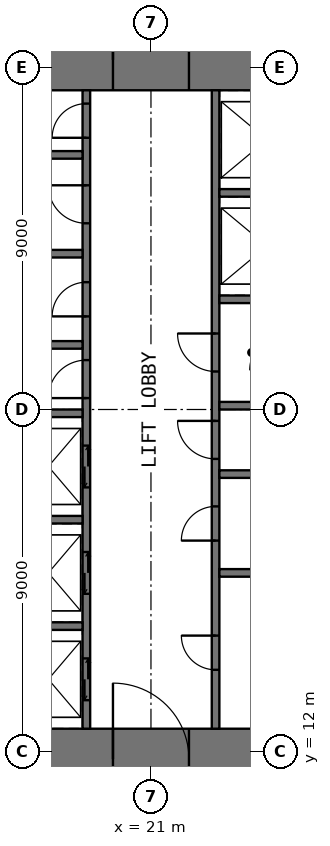
"""IFC4 building model, lengths in metres.
Left out: names, types, materials, properties, quantities, classifications, styles, units other than length and angle.
Written with IfcOpenShell. Run it as: python <this file> out.ifc"""

import sys

from ifc_helpers import new_model, si_unit, direction, frame, frame_2d, origin, place, context, subcontext, project, spatial, rectangle, extrude, element, fill, save


model = new_model("IFC4")
c1 = context("Model", 3, precision=1e-05, world=origin(), true_north=direction((0.0, 1.0)))
c2 = subcontext(c1, "Body", "Model", "MODEL_VIEW")
j1 = project(units=[si_unit("LENGTHUNIT", "METRE"), si_unit("PLANEANGLEUNIT", "RADIAN")], contexts=[c1])
p1 = place(None, origin())
s1 = spatial("IfcSite", under=j1, at=p1, CompositionType="ELEMENT")
p2 = place(p1, origin())
s2 = spatial("IfcBuilding", under=s1, at=p2, CompositionType="ELEMENT")
p3 = place(p2, frame((0.0, 0.0, 128.5)))
s3 = spatial("IfcBuildingStorey", under=s2, at=p3, CompositionType="ELEMENT", Elevation=128.5)
p4 = place(p3, frame((11.0, 11.8, -0.05), z_axis=(0.0, 0.0, 1.0), x_axis=(1.0, 0.0, 0.0)))
e1 = element("IfcWall", 1, at=p4, inside=s3, PredefinedType="SHEAR", context=c2, shape_type="SweptSolid", body=[
    extrude(rectangle(XDim=20.0, YDim=1.6, at=frame_2d((10.0, 0.0))), origin(), (0.0, 0.0, 1.0), 4.0),
])
p5 = place(p4, frame((9.0, 0.0, 0.05)))
e2 = element("IfcOpeningElement", 2, at=p5, cuts=e1, PredefinedType="OPENING", context=c2, shape_type="SweptSolid", body=[
    extrude(rectangle(XDim=2.0, YDim=2.2, at=frame_2d((1.0, 1.1))), frame((0.0, 0.81, 0.0), z_axis=(0.0, -1.0, 0.0), x_axis=(1.0, 0.0, 0.0)), (0.0, 0.0, 1.0), 1.62),
])
p6 = place(p3, frame((11.0, 30.2, -0.05), z_axis=(0.0, 0.0, 1.0), x_axis=(1.0, 0.0, 0.0)))
e3 = element("IfcWall", 3, at=p6, inside=s3, PredefinedType="SHEAR", context=c2, shape_type="SweptSolid", body=[
    extrude(rectangle(XDim=20.0, YDim=1.6, at=frame_2d((10.0, 0.0))), origin(), (0.0, 0.0, 1.0), 4.0),
])
p7 = place(p6, frame((9.0, 0.0, 0.05)))
e4 = element("IfcOpeningElement", 4, at=p7, cuts=e3, PredefinedType="OPENING", context=c2, shape_type="SweptSolid", body=[
    extrude(rectangle(XDim=2.0, YDim=2.2, at=frame_2d((1.0, 1.1))), frame((0.0, 0.81, 0.0), z_axis=(0.0, -1.0, 0.0), x_axis=(1.0, 0.0, 0.0)), (0.0, 0.0, 1.0), 1.62),
])
p8 = place(p3, frame((19.3, 12.6, -0.05), z_axis=(0.0, 0.0, 1.0), x_axis=(0.0, 1.0, 0.0)))
e5 = element("IfcWall", 5, at=p8, inside=s3, PredefinedType="SHEAR", context=c2, shape_type="SweptSolid", body=[
    extrude(rectangle(XDim=16.8, YDim=0.2, at=frame_2d((8.4, 0.0))), origin(), (0.0, 0.0, 1.0), 4.0),
])
p9 = place(p8, frame((8.7, 0.0, 0.05)))
e6 = element("IfcOpeningElement", 6, at=p9, cuts=e5, PredefinedType="OPENING", context=c2, shape_type="SweptSolid", body=[
    extrude(rectangle(XDim=1.0, YDim=2.2, at=frame_2d((0.5, 1.1))), frame((0.0, 0.11, 0.0), z_axis=(0.0, -1.0, 0.0), x_axis=(1.0, 0.0, 0.0)), (0.0, 0.0, 1.0), 0.22),
])
p10 = place(p8, frame((10.85, 0.0, 0.05)))
e7 = element("IfcOpeningElement", 7, at=p10, cuts=e5, PredefinedType="OPENING", context=c2, shape_type="SweptSolid", body=[
    extrude(rectangle(XDim=0.9, YDim=2.2, at=frame_2d((0.45, 1.1))), frame((0.0, 0.11, 0.0), z_axis=(0.0, -1.0, 0.0), x_axis=(1.0, 0.0, 0.0)), (0.0, 0.0, 1.0), 0.22),
])
p11 = place(p8, frame((13.3, 0.0, 0.05)))
e8 = element("IfcOpeningElement", 8, at=p11, cuts=e5, PredefinedType="OPENING", context=c2, shape_type="SweptSolid", body=[
    extrude(rectangle(XDim=1.0, YDim=2.2, at=frame_2d((0.5, 1.1))), frame((0.0, 0.11, 0.0), z_axis=(0.0, -1.0, 0.0), x_axis=(1.0, 0.0, 0.0)), (0.0, 0.0, 1.0), 0.22),
])
p12 = place(p8, frame((15.55, 0.0, 0.05)))
e9 = element("IfcOpeningElement", 9, at=p12, cuts=e5, PredefinedType="OPENING", context=c2, shape_type="SweptSolid", body=[
    extrude(rectangle(XDim=0.9, YDim=2.2, at=frame_2d((0.45, 1.1))), frame((0.0, 0.11, 0.0), z_axis=(0.0, -1.0, 0.0), x_axis=(1.0, 0.0, 0.0)), (0.0, 0.0, 1.0), 0.22),
])
p13 = place(p8, frame((0.75, 0.0, 0.05)))
e10 = element("IfcOpeningElement", 10, at=p13, cuts=e5, PredefinedType="OPENING", context=c2, shape_type="SweptSolid", body=[
    extrude(rectangle(XDim=1.1, YDim=2.2, at=frame_2d((0.55, 1.1))), frame((0.0, 0.11, 0.0), z_axis=(0.0, -1.0, 0.0), x_axis=(1.0, 0.0, 0.0)), (0.0, 0.0, 1.0), 0.22),
])
p14 = place(p8, frame((3.55, 0.0, 0.05)))
e11 = element("IfcOpeningElement", 11, at=p14, cuts=e5, PredefinedType="OPENING", context=c2, shape_type="SweptSolid", body=[
    extrude(rectangle(XDim=1.1, YDim=2.2, at=frame_2d((0.55, 1.1))), frame((0.0, 0.11, 0.0), z_axis=(0.0, -1.0, 0.0), x_axis=(1.0, 0.0, 0.0)), (0.0, 0.0, 1.0), 0.22),
])
p15 = place(p8, frame((6.35, 0.0, 0.05)))
e12 = element("IfcOpeningElement", 12, at=p15, cuts=e5, PredefinedType="OPENING", context=c2, shape_type="SweptSolid", body=[
    extrude(rectangle(XDim=1.1, YDim=2.2, at=frame_2d((0.55, 1.1))), frame((0.0, 0.11, 0.0), z_axis=(0.0, -1.0, 0.0), x_axis=(1.0, 0.0, 0.0)), (0.0, 0.0, 1.0), 0.22),
])
p16 = place(p3, frame((22.7, 12.6, -0.05), z_axis=(0.0, 0.0, 1.0), x_axis=(0.0, 1.0, 0.0)))
e13 = element("IfcWall", 13, at=p16, inside=s3, PredefinedType="SHEAR", context=c2, shape_type="SweptSolid", body=[
    extrude(rectangle(XDim=16.8, YDim=0.2, at=frame_2d((8.4, 0.0))), origin(), (0.0, 0.0, 1.0), 4.0),
])
p17 = place(p16, frame((7.1, 0.0, 0.05)))
e14 = element("IfcOpeningElement", 14, at=p17, cuts=e13, PredefinedType="OPENING", context=c2, shape_type="SweptSolid", body=[
    extrude(rectangle(XDim=1.0, YDim=2.2, at=frame_2d((0.5, 1.1))), frame((0.0, 0.11, 0.0), z_axis=(0.0, -1.0, 0.0), x_axis=(1.0, 0.0, 0.0)), (0.0, 0.0, 1.0), 0.22),
])
p18 = place(p16, frame((1.55, 0.0, 0.05)))
e15 = element("IfcOpeningElement", 15, at=p18, cuts=e13, PredefinedType="OPENING", context=c2, shape_type="SweptSolid", body=[
    extrude(rectangle(XDim=0.9, YDim=2.2, at=frame_2d((0.45, 1.1))), frame((0.0, 0.11, 0.0), z_axis=(0.0, -1.0, 0.0), x_axis=(1.0, 0.0, 0.0)), (0.0, 0.0, 1.0), 0.22),
])
p19 = place(p16, frame((4.95, 0.0, 0.05)))
e16 = element("IfcOpeningElement", 16, at=p19, cuts=e13, PredefinedType="OPENING", context=c2, shape_type="SweptSolid", body=[
    extrude(rectangle(XDim=0.9, YDim=2.2, at=frame_2d((0.45, 1.1))), frame((0.0, 0.11, 0.0), z_axis=(0.0, -1.0, 0.0), x_axis=(1.0, 0.0, 0.0)), (0.0, 0.0, 1.0), 0.22),
])
p20 = place(p16, frame((9.4, 0.0, 0.05)))
e17 = element("IfcOpeningElement", 17, at=p20, cuts=e13, PredefinedType="OPENING", context=c2, shape_type="SweptSolid", body=[
    extrude(rectangle(XDim=1.0, YDim=2.2, at=frame_2d((0.5, 1.1))), frame((0.0, 0.11, 0.0), z_axis=(0.0, -1.0, 0.0), x_axis=(1.0, 0.0, 0.0)), (0.0, 0.0, 1.0), 0.22),
])
for number, where, z_axis, x_axis in (
    (18, (16.0, 15.3, -0.05), (0.0, 0.0, 1.0), (1.0, 0.0, 0.0)),
    (19, (16.0, 18.1, -0.05), (0.0, 0.0, 1.0), (1.0, 0.0, 0.0)),
    (20, (16.0, 20.9, -0.05), (0.0, 0.0, 1.0), (1.0, 0.0, 0.0)),
    (21, (16.0, 22.7, -0.05), (0.0, 0.0, 1.0), (1.0, 0.0, 0.0)),
    (22, (16.0, 25.1, -0.05), (0.0, 0.0, 1.0), (1.0, 0.0, 0.0)),
    (23, (16.0, 27.7, -0.05), (0.0, 0.0, 1.0), (1.0, 0.0, 0.0)),
    (24, (22.8, 16.7, -0.05), (0.0, 0.0, 1.0), (1.0, 0.0, 0.0)),
    (25, (22.8, 19.3, -0.05), (0.0, 0.0, 1.0), (1.0, 0.0, 0.0)),
    (26, (22.8, 21.1, -0.05), (0.0, 0.0, 1.0), (1.0, 0.0, 0.0)),
    (27, (22.8, 23.9, -0.05), (0.0, 0.0, 1.0), (1.0, 0.0, 0.0)),
    (28, (22.8, 26.7, -0.05), (0.0, 0.0, 1.0), (1.0, 0.0, 0.0)),
):
    element("IfcWall", number, at=place(p3, frame(where, z_axis=z_axis, x_axis=x_axis)), inside=s3, PredefinedType="SHEAR", context=c2, shape_type="SweptSolid", body=[
        extrude(rectangle(XDim=3.2, YDim=0.2, at=frame_2d((1.6, 0.0))), origin(), (0.0, 0.0, 1.0), 4.0),
    ])
p21 = place(p5, origin())
e29 = element("IfcDoor", 29, at=p21, inside=s3, OperationType="DOUBLE_DOOR_SINGLE_SWING", PredefinedType="DOOR", context=c2, shape_type="SweptSolid", body=[
    extrude(rectangle(XDim=2.0, YDim=2.2, at=frame_2d((1.0, 1.1))), frame((0.0, 0.025, 0.0), z_axis=(0.0, -1.0, 0.0), x_axis=(1.0, 0.0, 0.0)), (0.0, 0.0, 1.0), 0.05),
])
fill(e2, e29)
p22 = place(p7, origin())
e30 = element("IfcDoor", 30, at=p22, inside=s3, OperationType="DOUBLE_DOOR_SINGLE_SWING", PredefinedType="DOOR", context=c2, shape_type="SweptSolid", body=[
    extrude(rectangle(XDim=2.0, YDim=2.2, at=frame_2d((1.0, 1.1))), frame((0.0, 0.025, 0.0), z_axis=(0.0, -1.0, 0.0), x_axis=(1.0, 0.0, 0.0)), (0.0, 0.0, 1.0), 0.05),
])
fill(e4, e30)
p23 = place(p9, origin())
e31 = element("IfcDoor", 31, at=p23, inside=s3, OperationType="SINGLE_SWING_LEFT", PredefinedType="DOOR", context=c2, shape_type="SweptSolid", body=[
    extrude(rectangle(XDim=1.0, YDim=2.2, at=frame_2d((0.5, 1.1))), frame((0.0, 0.025, 0.0), z_axis=(0.0, -1.0, 0.0), x_axis=(1.0, 0.0, 0.0)), (0.0, 0.0, 1.0), 0.05),
])
fill(e6, e31)
p24 = place(p17, origin())
e32 = element("IfcDoor", 32, at=p24, inside=s3, OperationType="SINGLE_SWING_RIGHT", PredefinedType="DOOR", context=c2, shape_type="SweptSolid", body=[
    extrude(rectangle(XDim=1.0, YDim=2.2, at=frame_2d((0.5, 1.1))), frame((0.0, 0.025, 0.0), z_axis=(0.0, -1.0, 0.0), x_axis=(1.0, 0.0, 0.0)), (0.0, 0.0, 1.0), 0.05),
])
fill(e14, e32)
p25 = place(p10, origin())
e33 = element("IfcDoor", 33, at=p25, inside=s3, OperationType="SINGLE_SWING_LEFT", PredefinedType="DOOR", context=c2, shape_type="SweptSolid", body=[
    extrude(rectangle(XDim=0.9, YDim=2.2, at=frame_2d((0.45, 1.1))), frame((0.0, 0.025, 0.0), z_axis=(0.0, -1.0, 0.0), x_axis=(1.0, 0.0, 0.0)), (0.0, 0.0, 1.0), 0.05),
])
fill(e7, e33)
p26 = place(p11, origin())
e34 = element("IfcDoor", 34, at=p26, inside=s3, OperationType="SINGLE_SWING_RIGHT", PredefinedType="DOOR", context=c2, shape_type="SweptSolid", body=[
    extrude(rectangle(XDim=1.0, YDim=2.2, at=frame_2d((0.5, 1.1))), frame((0.0, 0.025, 0.0), z_axis=(0.0, -1.0, 0.0), x_axis=(1.0, 0.0, 0.0)), (0.0, 0.0, 1.0), 0.05),
])
fill(e8, e34)
p27 = place(p12, origin())
e35 = element("IfcDoor", 35, at=p27, inside=s3, OperationType="SINGLE_SWING_LEFT", PredefinedType="DOOR", context=c2, shape_type="SweptSolid", body=[
    extrude(rectangle(XDim=0.9, YDim=2.2, at=frame_2d((0.45, 1.1))), frame((0.0, 0.025, 0.0), z_axis=(0.0, -1.0, 0.0), x_axis=(1.0, 0.0, 0.0)), (0.0, 0.0, 1.0), 0.05),
])
fill(e9, e35)
p28 = place(p18, origin())
e36 = element("IfcDoor", 36, at=p28, inside=s3, OperationType="SINGLE_SWING_RIGHT", PredefinedType="DOOR", context=c2, shape_type="SweptSolid", body=[
    extrude(rectangle(XDim=0.9, YDim=2.2, at=frame_2d((0.45, 1.1))), frame((0.0, 0.025, 0.0), z_axis=(0.0, -1.0, 0.0), x_axis=(1.0, 0.0, 0.0)), (0.0, 0.0, 1.0), 0.05),
])
fill(e15, e36)
p29 = place(p19, origin())
e37 = element("IfcDoor", 37, at=p29, inside=s3, OperationType="SINGLE_SWING_LEFT", PredefinedType="DOOR", context=c2, shape_type="SweptSolid", body=[
    extrude(rectangle(XDim=0.9, YDim=2.2, at=frame_2d((0.45, 1.1))), frame((0.0, 0.025, 0.0), z_axis=(0.0, -1.0, 0.0), x_axis=(1.0, 0.0, 0.0)), (0.0, 0.0, 1.0), 0.05),
])
fill(e16, e37)
p30 = place(p20, origin())
e38 = element("IfcDoor", 38, at=p30, inside=s3, OperationType="SINGLE_SWING_RIGHT", PredefinedType="DOOR", context=c2, shape_type="SweptSolid", body=[
    extrude(rectangle(XDim=1.0, YDim=2.2, at=frame_2d((0.5, 1.1))), frame((0.0, 0.025, 0.0), z_axis=(0.0, -1.0, 0.0), x_axis=(1.0, 0.0, 0.0)), (0.0, 0.0, 1.0), 0.05),
])
fill(e17, e38)
p31 = place(p13, origin())
e39 = element("IfcDoor", 39, at=p31, inside=s3, OperationType="DOUBLE_DOOR_SLIDING", PredefinedType="DOOR", context=c2, shape_type="SweptSolid", body=[
    extrude(rectangle(XDim=1.1, YDim=2.2, at=frame_2d((0.55, 1.1))), frame((0.0, 0.025, 0.0), z_axis=(0.0, -1.0, 0.0), x_axis=(1.0, 0.0, 0.0)), (0.0, 0.0, 1.0), 0.05),
])
fill(e10, e39)
p32 = place(p14, origin())
e40 = element("IfcDoor", 40, at=p32, inside=s3, OperationType="DOUBLE_DOOR_SLIDING", PredefinedType="DOOR", context=c2, shape_type="SweptSolid", body=[
    extrude(rectangle(XDim=1.1, YDim=2.2, at=frame_2d((0.55, 1.1))), frame((0.0, 0.025, 0.0), z_axis=(0.0, -1.0, 0.0), x_axis=(1.0, 0.0, 0.0)), (0.0, 0.0, 1.0), 0.05),
])
fill(e11, e40)
p33 = place(p15, origin())
e41 = element("IfcDoor", 41, at=p33, inside=s3, OperationType="DOUBLE_DOOR_SLIDING", PredefinedType="DOOR", context=c2, shape_type="SweptSolid", body=[
    extrude(rectangle(XDim=1.1, YDim=2.2, at=frame_2d((0.55, 1.1))), frame((0.0, 0.025, 0.0), z_axis=(0.0, -1.0, 0.0), x_axis=(1.0, 0.0, 0.0)), (0.0, 0.0, 1.0), 0.05),
])
fill(e12, e41)
save(model, sys.argv[1])
